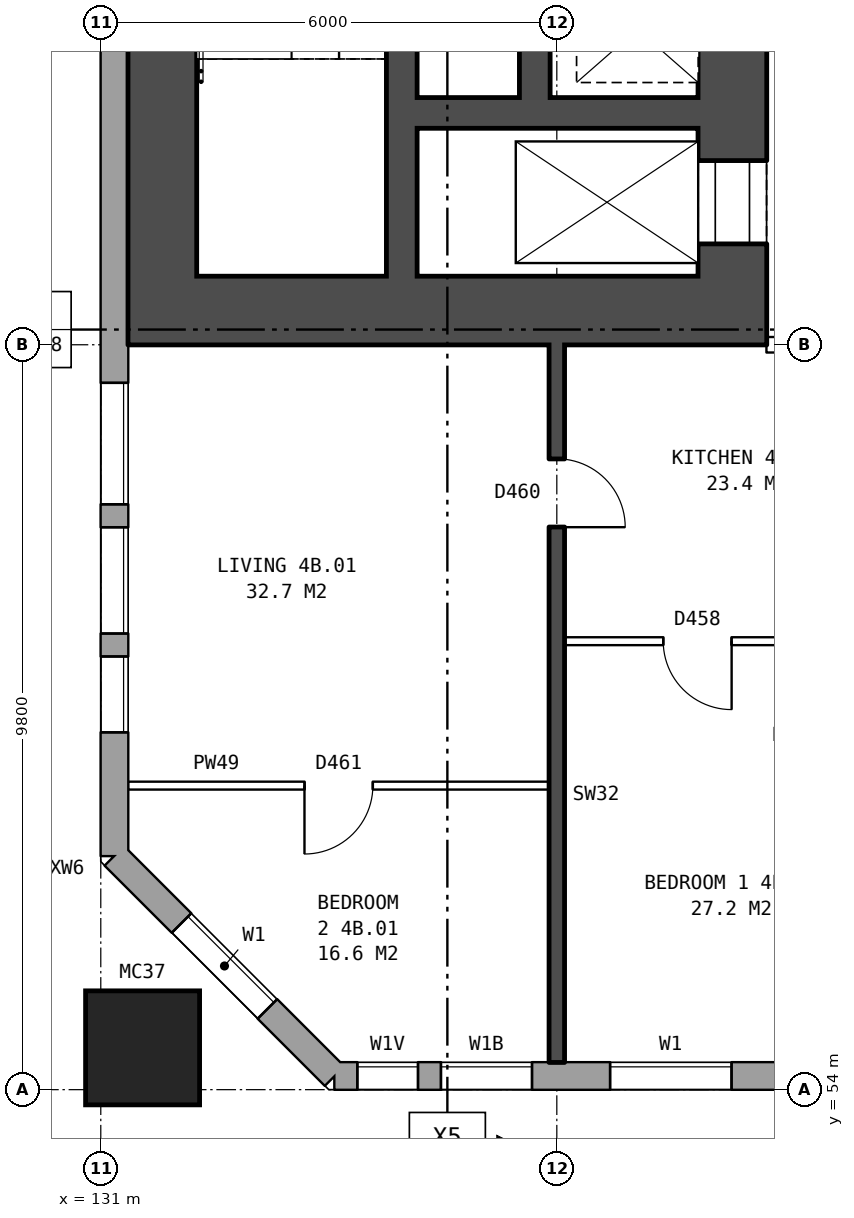
"""IFC4 building model, lengths in metres.
Left out: names, types, materials, properties, quantities, classifications, styles, units other than length and angle.
Written with IfcOpenShell. Run it as: python <this file> out.ifc"""

import sys

from ifc_helpers import new_model, si_unit, direction, frame, frame_2d, origin, origin_2d, place, context, subcontext, project, spatial, rectangle, hollow_rectangle, extrude, element, fill, save


model = new_model("IFC4")
c1 = context("Model", 3, precision=1e-05, world=origin(), true_north=direction((0.0, 1.0)))
c2 = subcontext(c1, "Body", "Model", "MODEL_VIEW")
j1 = project(units=[si_unit("LENGTHUNIT", "METRE"), si_unit("PLANEANGLEUNIT", "RADIAN")], contexts=[c1])
p1 = place(None, origin())
s1 = spatial("IfcSite", under=j1, at=p1, CompositionType="ELEMENT")
p2 = place(p1, origin())
s2 = spatial("IfcBuilding", under=s1, at=p2, CompositionType="ELEMENT")
p3 = place(p2, frame((0.0, 0.0, 19.5)))
s3 = spatial("IfcBuildingStorey", under=s2, at=p3, CompositionType="ELEMENT", Elevation=19.5)
p4 = place(p3, frame((131.55, 54.55, 0.0), z_axis=(0.0, 0.0, 1.0), x_axis=(1.0, 0.0, 0.0)))
e1 = element("IfcColumn", 1, at=p4, inside=s3, PredefinedType="COLUMN", context=c2, shape_type="SweptSolid", body=[
    extrude(hollow_rectangle(XDim=1.5, YDim=1.5, WallThickness=0.08, at=origin_2d()), origin(), (0.0, 0.0, 1.0), 3.1),
])
p5 = place(p3, frame((131.18, 57.075, 0.0), z_axis=(0.0, 0.0, 1.0), x_axis=(0.707106781187, -0.707106781187, 0.0)))
e2 = element("IfcWall", 2, at=p5, inside=s3, PredefinedType="STANDARD", context=c2, shape_type="SweptSolid", body=[
    extrude(rectangle(XDim=4.094, YDim=0.36, at=frame_2d((2.047, 0.0))), origin(), (0.0, 0.0, 1.0), 2.85),
])
p6 = place(p5, frame((1.247, 0.0, 0.8)))
e3 = element("IfcOpeningElement", 3, at=p6, cuts=e2, PredefinedType="OPENING", context=c2, shape_type="SweptSolid", body=[
    extrude(rectangle(XDim=1.6, YDim=1.8, at=frame_2d((0.8, 0.9))), frame((0.0, 0.19, 0.0), z_axis=(0.0, -1.0, 0.0), x_axis=(1.0, 0.0, 0.0)), (0.0, 0.0, 1.0), 0.38),
])
p7 = place(p3, frame((134.075, 54.18, 0.0), z_axis=(0.0, 0.0, 1.0), x_axis=(1.0, 0.0, 0.0)))
e4 = element("IfcWall", 4, at=p7, inside=s3, PredefinedType="STANDARD", context=c2, shape_type="SweptSolid", body=[
    extrude(rectangle(XDim=40.601, YDim=0.36, at=frame_2d((20.3, 0.0))), origin(), (0.0, 0.0, 1.0), 2.85),
])
p8 = place(p7, frame((0.3, 0.0, 0.8)))
e5 = element("IfcOpeningElement", 5, at=p8, cuts=e4, PredefinedType="OPENING", context=c2, shape_type="SweptSolid", body=[
    extrude(rectangle(XDim=0.8, YDim=0.9, at=frame_2d((0.4, 0.45))), frame((0.0, 0.19, 0.0), z_axis=(0.0, -1.0, 0.0), x_axis=(1.0, 0.0, 0.0)), (0.0, 0.0, 1.0), 0.38),
])
p9 = place(p7, frame((3.625, 0.0, 0.8)))
e6 = element("IfcOpeningElement", 6, at=p9, cuts=e4, PredefinedType="OPENING", context=c2, shape_type="SweptSolid", body=[
    extrude(rectangle(XDim=1.6, YDim=1.8, at=frame_2d((0.8, 0.9))), frame((0.0, 0.19, 0.0), z_axis=(0.0, -1.0, 0.0), x_axis=(1.0, 0.0, 0.0)), (0.0, 0.0, 1.0), 0.38),
])
p10 = place(p7, frame((6.625, 0.0, 0.8)))
e7 = element("IfcOpeningElement", 7, at=p10, cuts=e4, PredefinedType="OPENING", context=c2, shape_type="SweptSolid", body=[
    extrude(rectangle(XDim=1.6, YDim=1.8, at=frame_2d((0.8, 0.9))), frame((0.0, 0.19, 0.0), z_axis=(0.0, -1.0, 0.0), x_axis=(1.0, 0.0, 0.0)), (0.0, 0.0, 1.0), 0.38),
])
p11 = place(p7, frame((9.625, 0.0, 0.8)))
e8 = element("IfcOpeningElement", 8, at=p11, cuts=e4, PredefinedType="OPENING", context=c2, shape_type="SweptSolid", body=[
    extrude(rectangle(XDim=1.6, YDim=1.8, at=frame_2d((0.8, 0.9))), frame((0.0, 0.19, 0.0), z_axis=(0.0, -1.0, 0.0), x_axis=(1.0, 0.0, 0.0)), (0.0, 0.0, 1.0), 0.38),
])
p12 = place(p7, frame((12.625, 0.0, 0.8)))
e9 = element("IfcOpeningElement", 9, at=p12, cuts=e4, PredefinedType="OPENING", context=c2, shape_type="SweptSolid", body=[
    extrude(rectangle(XDim=1.6, YDim=1.8, at=frame_2d((0.8, 0.9))), frame((0.0, 0.19, 0.0), z_axis=(0.0, -1.0, 0.0), x_axis=(1.0, 0.0, 0.0)), (0.0, 0.0, 1.0), 0.38),
])
p13 = place(p7, frame((15.625, 0.0, 0.8)))
e10 = element("IfcOpeningElement", 10, at=p13, cuts=e4, PredefinedType="OPENING", context=c2, shape_type="SweptSolid", body=[
    extrude(rectangle(XDim=1.6, YDim=1.8, at=frame_2d((0.8, 0.9))), frame((0.0, 0.19, 0.0), z_axis=(0.0, -1.0, 0.0), x_axis=(1.0, 0.0, 0.0)), (0.0, 0.0, 1.0), 0.38),
])
p14 = place(p7, frame((18.625, 0.0, 0.8)))
e11 = element("IfcOpeningElement", 11, at=p14, cuts=e4, PredefinedType="OPENING", context=c2, shape_type="SweptSolid", body=[
    extrude(rectangle(XDim=1.6, YDim=1.8, at=frame_2d((0.8, 0.9))), frame((0.0, 0.19, 0.0), z_axis=(0.0, -1.0, 0.0), x_axis=(1.0, 0.0, 0.0)), (0.0, 0.0, 1.0), 0.38),
])
p15 = place(p7, frame((21.625, 0.0, 0.8)))
e12 = element("IfcOpeningElement", 12, at=p15, cuts=e4, PredefinedType="OPENING", context=c2, shape_type="SweptSolid", body=[
    extrude(rectangle(XDim=1.6, YDim=1.8, at=frame_2d((0.8, 0.9))), frame((0.0, 0.19, 0.0), z_axis=(0.0, -1.0, 0.0), x_axis=(1.0, 0.0, 0.0)), (0.0, 0.0, 1.0), 0.38),
])
p16 = place(p7, frame((24.625, 0.0, 0.8)))
e13 = element("IfcOpeningElement", 13, at=p16, cuts=e4, PredefinedType="OPENING", context=c2, shape_type="SweptSolid", body=[
    extrude(rectangle(XDim=1.6, YDim=1.8, at=frame_2d((0.8, 0.9))), frame((0.0, 0.19, 0.0), z_axis=(0.0, -1.0, 0.0), x_axis=(1.0, 0.0, 0.0)), (0.0, 0.0, 1.0), 0.38),
])
p17 = place(p7, frame((27.625, 0.0, 0.8)))
e14 = element("IfcOpeningElement", 14, at=p17, cuts=e4, PredefinedType="OPENING", context=c2, shape_type="SweptSolid", body=[
    extrude(rectangle(XDim=1.6, YDim=1.8, at=frame_2d((0.8, 0.9))), frame((0.0, 0.19, 0.0), z_axis=(0.0, -1.0, 0.0), x_axis=(1.0, 0.0, 0.0)), (0.0, 0.0, 1.0), 0.38),
])
p18 = place(p7, frame((30.625, 0.0, 0.8)))
e15 = element("IfcOpeningElement", 15, at=p18, cuts=e4, PredefinedType="OPENING", context=c2, shape_type="SweptSolid", body=[
    extrude(rectangle(XDim=1.6, YDim=1.8, at=frame_2d((0.8, 0.9))), frame((0.0, 0.19, 0.0), z_axis=(0.0, -1.0, 0.0), x_axis=(1.0, 0.0, 0.0)), (0.0, 0.0, 1.0), 0.38),
])
p19 = place(p7, frame((33.625, 0.0, 0.8)))
e16 = element("IfcOpeningElement", 16, at=p19, cuts=e4, PredefinedType="OPENING", context=c2, shape_type="SweptSolid", body=[
    extrude(rectangle(XDim=1.6, YDim=1.8, at=frame_2d((0.8, 0.9))), frame((0.0, 0.19, 0.0), z_axis=(0.0, -1.0, 0.0), x_axis=(1.0, 0.0, 0.0)), (0.0, 0.0, 1.0), 0.38),
])
p20 = place(p7, frame((36.625, 0.0, 0.8)))
e17 = element("IfcOpeningElement", 17, at=p20, cuts=e4, PredefinedType="OPENING", context=c2, shape_type="SweptSolid", body=[
    extrude(rectangle(XDim=1.6, YDim=1.8, at=frame_2d((0.8, 0.9))), frame((0.0, 0.19, 0.0), z_axis=(0.0, -1.0, 0.0), x_axis=(1.0, 0.0, 0.0)), (0.0, 0.0, 1.0), 0.38),
])
p21 = place(p7, frame((1.4, 0.0, 0.8)))
e18 = element("IfcOpeningElement", 18, at=p21, cuts=e4, PredefinedType="OPENING", context=c2, shape_type="SweptSolid", body=[
    extrude(rectangle(XDim=1.2, YDim=1.8, at=frame_2d((0.6, 0.9))), frame((0.0, 0.19, 0.0), z_axis=(0.0, -1.0, 0.0), x_axis=(1.0, 0.0, 0.0)), (0.0, 0.0, 1.0), 0.38),
])
p22 = place(p3, frame((131.18, 82.925, 0.0), z_axis=(0.0, 0.0, 1.0), x_axis=(0.0, -1.0, 0.0)))
e19 = element("IfcWall", 19, at=p22, inside=s3, PredefinedType="STANDARD", context=c2, shape_type="SweptSolid", body=[
    extrude(rectangle(XDim=25.851, YDim=0.36, at=frame_2d((12.925, 0.0))), origin(), (0.0, 0.0, 1.0), 2.85),
])
p23 = place(p22, frame((1.475, 0.0, 0.8)))
e20 = element("IfcOpeningElement", 20, at=p23, cuts=e19, PredefinedType="OPENING", context=c2, shape_type="SweptSolid", body=[
    extrude(rectangle(XDim=1.0, YDim=1.2, at=frame_2d((0.5, 0.6))), frame((0.0, 0.19, 0.0), z_axis=(0.0, -1.0, 0.0), x_axis=(1.0, 0.0, 0.0)), (0.0, 0.0, 1.0), 0.38),
])
p24 = place(p22, frame((4.625, 0.0, 0.8)))
e21 = element("IfcOpeningElement", 21, at=p24, cuts=e19, PredefinedType="OPENING", context=c2, shape_type="SweptSolid", body=[
    extrude(rectangle(XDim=1.6, YDim=1.8, at=frame_2d((0.8, 0.9))), frame((0.0, 0.19, 0.0), z_axis=(0.0, -1.0, 0.0), x_axis=(1.0, 0.0, 0.0)), (0.0, 0.0, 1.0), 0.38),
])
p25 = place(p22, frame((19.625, 0.0, 0.8)))
e22 = element("IfcOpeningElement", 22, at=p25, cuts=e19, PredefinedType="OPENING", context=c2, shape_type="SweptSolid", body=[
    extrude(rectangle(XDim=1.6, YDim=1.8, at=frame_2d((0.8, 0.9))), frame((0.0, 0.19, 0.0), z_axis=(0.0, -1.0, 0.0), x_axis=(1.0, 0.0, 0.0)), (0.0, 0.0, 1.0), 0.38),
])
p26 = place(p22, frame((21.525, 0.0, 0.8)))
e23 = element("IfcOpeningElement", 23, at=p26, cuts=e19, PredefinedType="OPENING", context=c2, shape_type="SweptSolid", body=[
    extrude(rectangle(XDim=1.4, YDim=1.8, at=frame_2d((0.7, 0.9))), frame((0.0, 0.19, 0.0), z_axis=(0.0, -1.0, 0.0), x_axis=(1.0, 0.0, 0.0)), (0.0, 0.0, 1.0), 0.38),
])
p27 = place(p22, frame((2.775, 0.0, 0.8)))
e24 = element("IfcOpeningElement", 24, at=p27, cuts=e19, PredefinedType="OPENING", context=c2, shape_type="SweptSolid", body=[
    extrude(rectangle(XDim=1.4, YDim=1.8, at=frame_2d((0.7, 0.9))), frame((0.0, 0.19, 0.0), z_axis=(0.0, -1.0, 0.0), x_axis=(1.0, 0.0, 0.0)), (0.0, 0.0, 1.0), 0.38),
])
p28 = place(p22, frame((23.225, 0.0, 0.8)))
e25 = element("IfcOpeningElement", 25, at=p28, cuts=e19, PredefinedType="OPENING", context=c2, shape_type="SweptSolid", body=[
    extrude(rectangle(XDim=1.0, YDim=1.2, at=frame_2d((0.5, 0.6))), frame((0.0, 0.19, 0.0), z_axis=(0.0, -1.0, 0.0), x_axis=(1.0, 0.0, 0.0)), (0.0, 0.0, 1.0), 0.38),
])
p29 = place(p3, frame((139.31, 64.7, 0.0), z_axis=(0.0, 0.0, 1.0), x_axis=(0.0, 1.0, 0.0)))
e26 = element("IfcWall", 26, at=p29, inside=s3, PredefinedType="SHEAR", context=c2, shape_type="SweptSolid", body=[
    extrude(rectangle(XDim=10.6, YDim=0.9, at=frame_2d((5.3, 0.0))), origin(), (0.0, 0.0, 1.0), 2.85),
])
p30 = place(p29, frame((0.425, 0.0, 0.0)))
e27 = element("IfcOpeningElement", 27, at=p30, cuts=e26, PredefinedType="OPENING", context=c2, shape_type="SweptSolid", body=[
    extrude(rectangle(XDim=1.1, YDim=2.1, at=frame_2d((0.55, 1.05))), frame((0.0, 0.46, 0.0), z_axis=(0.0, -1.0, 0.0), x_axis=(1.0, 0.0, 0.0)), (0.0, 0.0, 1.0), 0.92),
])
p31 = place(p29, frame((9.0, 0.0, 0.0)))
e28 = element("IfcOpeningElement", 28, at=p31, cuts=e26, PredefinedType="OPENING", context=c2, shape_type="SweptSolid", body=[
    extrude(rectangle(XDim=1.1, YDim=2.1, at=frame_2d((0.55, 1.05))), frame((0.0, 0.46, 0.0), z_axis=(0.0, -1.0, 0.0), x_axis=(1.0, 0.0, 0.0)), (0.0, 0.0, 1.0), 0.92),
])
p32 = place(p29, frame((7.225, 0.0, 0.0)))
e29 = element("IfcOpeningElement", 29, at=p32, cuts=e26, PredefinedType="OPENING", context=c2, shape_type="SweptSolid", body=[
    extrude(rectangle(XDim=0.85, YDim=2.1, at=frame_2d((0.425, 1.05))), frame((0.0, 0.46, 0.0), z_axis=(0.0, -1.0, 0.0), x_axis=(1.0, 0.0, 0.0)), (0.0, 0.0, 1.0), 0.92),
])
p33 = place(p3, frame((131.81, 64.7, 0.0), z_axis=(0.0, 0.0, 1.0), x_axis=(0.0, 1.0, 0.0)))
e30 = element("IfcWall", 30, at=p33, inside=s3, PredefinedType="SHEAR", context=c2, shape_type="SweptSolid", body=[
    extrude(rectangle(XDim=10.6, YDim=0.9, at=frame_2d((5.3, 0.0))), origin(), (0.0, 0.0, 1.0), 2.85),
])
p34 = place(p3, frame((139.76, 64.25, 0.0), z_axis=(0.0, 0.0, 1.0), x_axis=(-1.0, 0.0, 0.0)))
e31 = element("IfcWall", 31, at=p34, inside=s3, PredefinedType="SHEAR", context=c2, shape_type="SweptSolid", body=[
    extrude(rectangle(XDim=8.4, YDim=0.9, at=frame_2d((4.2, 0.0))), origin(), (0.0, 0.0, 1.0), 2.85),
])
p35 = place(p3, frame((138.86, 66.85, 0.0), z_axis=(0.0, 0.0, 1.0), x_axis=(-1.0, 0.0, 0.0)))
e32 = element("IfcWall", 32, at=p35, inside=s3, PredefinedType="SHEAR", context=c2, shape_type="SweptSolid", body=[
    extrude(rectangle(XDim=3.7, YDim=0.4, at=frame_2d((1.85, 0.0))), origin(), (0.0, 0.0, 1.0), 2.85),
])
p36 = place(p3, frame((136.71, 67.05, 0.0), z_axis=(0.0, 0.0, 1.0), x_axis=(0.0, 1.0, 0.0)))
e33 = element("IfcWall", 33, at=p36, inside=s3, PredefinedType="SHEAR", context=c2, shape_type="SweptSolid", body=[
    extrude(rectangle(XDim=4.0, YDim=0.4, at=frame_2d((2.0, 0.0))), origin(), (0.0, 0.0, 1.0), 2.85),
])
p37 = place(p3, frame((134.96, 64.7, 0.0), z_axis=(0.0, 0.0, 1.0), x_axis=(0.0, 1.0, 0.0)))
e34 = element("IfcWall", 34, at=p37, inside=s3, PredefinedType="SHEAR", context=c2, shape_type="SweptSolid", body=[
    extrude(rectangle(XDim=6.35, YDim=0.4, at=frame_2d((3.175, 0.0))), origin(), (0.0, 0.0, 1.0), 2.85),
])
p38 = place(p3, frame((131.36, 58.0, 0.0), z_axis=(0.0, 0.0, 1.0), x_axis=(1.0, 0.0, 0.0)))
e35 = element("IfcWall", 35, at=p38, inside=s3, PredefinedType="PARTITIONING", context=c2, shape_type="SweptSolid", body=[
    extrude(rectangle(XDim=5.54, YDim=0.1, at=frame_2d((2.77, 0.0))), origin(), (0.0, 0.0, 1.0), 2.85),
])
p39 = place(p38, frame((2.32, 0.0, 0.0)))
e36 = element("IfcOpeningElement", 36, at=p39, cuts=e35, PredefinedType="OPENING", context=c2, shape_type="SweptSolid", body=[
    extrude(rectangle(XDim=0.9, YDim=2.1, at=frame_2d((0.45, 1.05))), frame((0.0, 0.06, 0.0), z_axis=(0.0, -1.0, 0.0), x_axis=(1.0, 0.0, 0.0)), (0.0, 0.0, 1.0), 0.12),
])
p40 = place(p3, frame((137.1, 59.9, 0.0), z_axis=(0.0, 0.0, 1.0), x_axis=(1.0, 0.0, 0.0)))
e37 = element("IfcWall", 37, at=p40, inside=s3, PredefinedType="PARTITIONING", context=c2, shape_type="SweptSolid", body=[
    extrude(rectangle(XDim=5.8, YDim=0.1, at=frame_2d((2.9, 0.0))), origin(), (0.0, 0.0, 1.0), 2.85),
])
p41 = place(p40, frame((1.3, 0.0, 0.0)))
e38 = element("IfcOpeningElement", 38, at=p41, cuts=e37, PredefinedType="OPENING", context=c2, shape_type="SweptSolid", body=[
    extrude(rectangle(XDim=0.9, YDim=2.1, at=frame_2d((0.45, 1.05))), frame((0.0, 0.06, 0.0), z_axis=(0.0, -1.0, 0.0), x_axis=(1.0, 0.0, 0.0)), (0.0, 0.0, 1.0), 0.12),
])
p42 = place(p40, frame((4.2, 0.0, 0.0)))
e39 = element("IfcOpeningElement", 39, at=p42, cuts=e37, PredefinedType="OPENING", context=c2, shape_type="SweptSolid", body=[
    extrude(rectangle(XDim=0.9, YDim=2.1, at=frame_2d((0.45, 1.05))), frame((0.0, 0.06, 0.0), z_axis=(0.0, -1.0, 0.0), x_axis=(1.0, 0.0, 0.0)), (0.0, 0.0, 1.0), 0.12),
])
p43 = place(p3, frame((139.76, 63.8, 0.0), z_axis=(0.0, 0.0, 1.0), x_axis=(1.0, 0.0, 0.0)))
e40 = element("IfcWall", 40, at=p43, inside=s3, PredefinedType="PARTITIONING", context=c2, shape_type="SweptSolid", body=[
    extrude(rectangle(XDim=3.0, YDim=0.2, at=frame_2d((1.5, 0.0))), origin(), (0.0, 0.0, 1.0), 2.85),
])
p44 = place(p43, frame((1.0, 0.0, 0.0)))
e41 = element("IfcOpeningElement", 41, at=p44, cuts=e40, PredefinedType="OPENING", context=c2, shape_type="SweptSolid", body=[
    extrude(rectangle(XDim=1.0, YDim=2.1, at=frame_2d((0.5, 1.05))), frame((0.0, 0.11, 0.0), z_axis=(0.0, -1.0, 0.0), x_axis=(1.0, 0.0, 0.0)), (0.0, 0.0, 1.0), 0.22),
])
p45 = place(p3, frame((137.0, 54.36, 0.0), z_axis=(0.0, 0.0, 1.0), x_axis=(0.0, 1.0, 0.0)))
e42 = element("IfcWall", 42, at=p45, inside=s3, PredefinedType="SOLIDWALL", context=c2, shape_type="SweptSolid", body=[
    extrude(rectangle(XDim=9.44, YDim=0.2, at=frame_2d((4.72, 0.0))), origin(), (0.0, 0.0, 1.0), 2.85),
])
p46 = place(p45, frame((7.04, 0.0, 0.0)))
e43 = element("IfcOpeningElement", 43, at=p46, cuts=e42, PredefinedType="OPENING", context=c2, shape_type="SweptSolid", body=[
    extrude(rectangle(XDim=0.9, YDim=2.1, at=frame_2d((0.45, 1.05))), frame((0.0, 0.11, 0.0), z_axis=(0.0, -1.0, 0.0), x_axis=(1.0, 0.0, 0.0)), (0.0, 0.0, 1.0), 0.22),
])
p47 = place(p6, origin())
e44 = element("IfcWindow", 44, at=p47, inside=s3, PartitioningType="SINGLE_PANEL", PredefinedType="WINDOW", context=c2, shape_type="SweptSolid", body=[
    extrude(rectangle(XDim=1.6, YDim=1.8, at=frame_2d((0.8, 0.9))), frame((0.0, 0.15, 0.0), z_axis=(0.0, -1.0, 0.0), x_axis=(1.0, 0.0, 0.0)), (0.0, 0.0, 1.0), 0.06),
])
fill(e3, e44)
p48 = place(p8, origin())
e45 = element("IfcWindow", 45, at=p48, inside=s3, PartitioningType="SINGLE_PANEL", PredefinedType="WINDOW", context=c2, shape_type="SweptSolid", body=[
    extrude(rectangle(XDim=0.8, YDim=0.9, at=frame_2d((0.4, 0.45))), frame((0.0, 0.15, 0.0), z_axis=(0.0, -1.0, 0.0), x_axis=(1.0, 0.0, 0.0)), (0.0, 0.0, 1.0), 0.06),
])
fill(e5, e45)
p49 = place(p9, origin())
e46 = element("IfcWindow", 46, at=p49, inside=s3, PartitioningType="SINGLE_PANEL", PredefinedType="WINDOW", context=c2, shape_type="SweptSolid", body=[
    extrude(rectangle(XDim=1.6, YDim=1.8, at=frame_2d((0.8, 0.9))), frame((0.0, 0.15, 0.0), z_axis=(0.0, -1.0, 0.0), x_axis=(1.0, 0.0, 0.0)), (0.0, 0.0, 1.0), 0.06),
])
fill(e6, e46)
p50 = place(p25, origin())
e47 = element("IfcWindow", 47, at=p50, inside=s3, PartitioningType="SINGLE_PANEL", PredefinedType="WINDOW", context=c2, shape_type="SweptSolid", body=[
    extrude(rectangle(XDim=1.6, YDim=1.8, at=frame_2d((0.8, 0.9))), frame((0.0, 0.15, 0.0), z_axis=(0.0, -1.0, 0.0), x_axis=(1.0, 0.0, 0.0)), (0.0, 0.0, 1.0), 0.06),
])
fill(e22, e47)
p51 = place(p26, origin())
e48 = element("IfcWindow", 48, at=p51, inside=s3, PartitioningType="SINGLE_PANEL", PredefinedType="WINDOW", context=c2, shape_type="SweptSolid", body=[
    extrude(rectangle(XDim=1.4, YDim=1.8, at=frame_2d((0.7, 0.9))), frame((0.0, 0.15, 0.0), z_axis=(0.0, -1.0, 0.0), x_axis=(1.0, 0.0, 0.0)), (0.0, 0.0, 1.0), 0.06),
])
fill(e23, e48)
p52 = place(p30, origin())
e49 = element("IfcDoor", 49, at=p52, inside=s3, OperationType="DOUBLE_DOOR_SLIDING", PredefinedType="DOOR", context=c2, shape_type="SweptSolid", body=[
    extrude(rectangle(XDim=1.1, YDim=2.1, at=frame_2d((0.55, 1.05))), frame((0.0, 0.435, 0.0), z_axis=(0.0, -1.0, 0.0), x_axis=(1.0, 0.0, 0.0)), (0.0, 0.0, 1.0), 0.05),
])
fill(e27, e49)
p53 = place(p41, frame((0.9, 0.0, 0.0), z_axis=(0.0, 0.0, 1.0), x_axis=(-1.0, 0.0, 0.0)))
e50 = element("IfcDoor", 50, at=p53, inside=s3, OperationType="SINGLE_SWING_LEFT", PredefinedType="DOOR", context=c2, shape_type="SweptSolid", body=[
    extrude(rectangle(XDim=0.9, YDim=2.1, at=frame_2d((0.45, 1.05))), frame((0.0, 0.025, 0.0), z_axis=(0.0, -1.0, 0.0), x_axis=(1.0, 0.0, 0.0)), (0.0, 0.0, 1.0), 0.05),
])
fill(e38, e50)
p54 = place(p39, frame((0.9, 0.0, 0.0), z_axis=(0.0, 0.0, 1.0), x_axis=(-1.0, 0.0, 0.0)))
e51 = element("IfcDoor", 51, at=p54, inside=s3, OperationType="SINGLE_SWING_RIGHT", PredefinedType="DOOR", context=c2, shape_type="SweptSolid", body=[
    extrude(rectangle(XDim=0.9, YDim=2.1, at=frame_2d((0.45, 1.05))), frame((0.0, 0.025, 0.0), z_axis=(0.0, -1.0, 0.0), x_axis=(1.0, 0.0, 0.0)), (0.0, 0.0, 1.0), 0.05),
])
fill(e36, e51)
p55 = place(p46, frame((0.9, 0.0, 0.0), z_axis=(0.0, 0.0, 1.0), x_axis=(-1.0, 0.0, 0.0)))
e52 = element("IfcDoor", 52, at=p55, inside=s3, OperationType="SINGLE_SWING_RIGHT", PredefinedType="DOOR", context=c2, shape_type="SweptSolid", body=[
    extrude(rectangle(XDim=0.9, YDim=2.1, at=frame_2d((0.45, 1.05))), frame((0.0, 0.025, 0.0), z_axis=(0.0, -1.0, 0.0), x_axis=(1.0, 0.0, 0.0)), (0.0, 0.0, 1.0), 0.05),
])
fill(e43, e52)
p56 = place(p21, origin())
e53 = element("IfcWindow", 53, at=p56, inside=s3, PartitioningType="SINGLE_PANEL", PredefinedType="WINDOW", context=c2, shape_type="SweptSolid", body=[
    extrude(rectangle(XDim=1.2, YDim=1.8, at=frame_2d((0.6, 0.9))), frame((0.0, 0.15, 0.0), z_axis=(0.0, -1.0, 0.0), x_axis=(1.0, 0.0, 0.0)), (0.0, 0.0, 1.0), 0.06),
])
fill(e18, e53)
p57 = place(p28, origin())
e54 = element("IfcWindow", 54, at=p57, inside=s3, PartitioningType="SINGLE_PANEL", PredefinedType="WINDOW", context=c2, shape_type="SweptSolid", body=[
    extrude(rectangle(XDim=1.0, YDim=1.2, at=frame_2d((0.5, 0.6))), frame((0.0, 0.15, 0.0), z_axis=(0.0, -1.0, 0.0), x_axis=(1.0, 0.0, 0.0)), (0.0, 0.0, 1.0), 0.06),
])
fill(e25, e54)
save(model, sys.argv[1])
